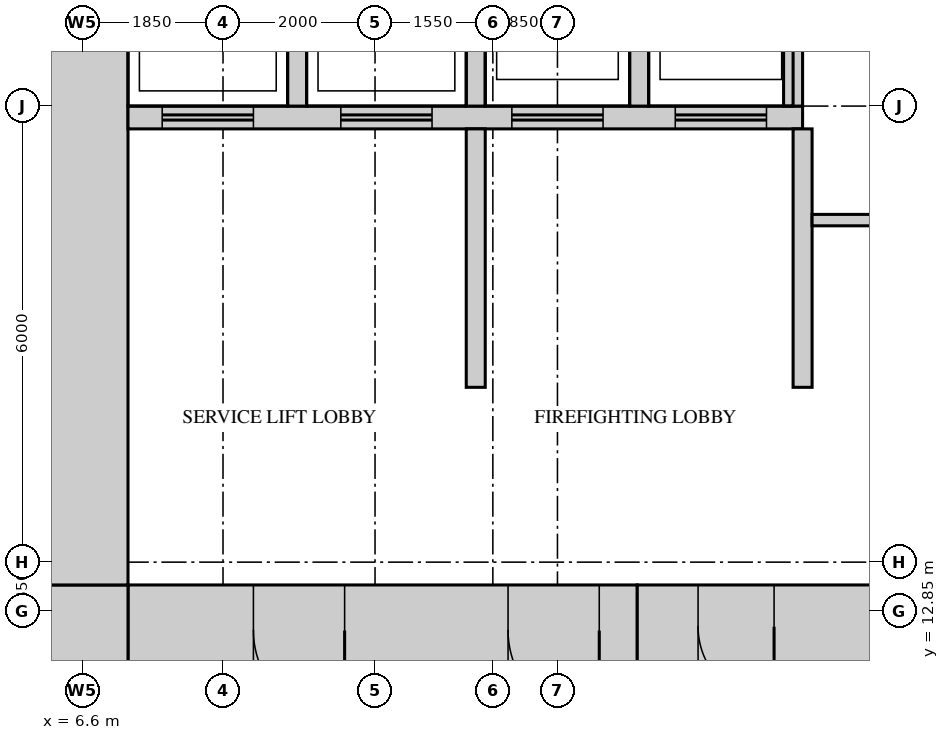
"""IFC4 building model, lengths in metres.
Left out: names, types, materials, properties, quantities, classifications, styles, units other than length and angle.
Written with IfcOpenShell. Run it as: python <this file> out.ifc"""

import sys

from ifc_helpers import new_model, si_unit, direction, frame, frame_2d, origin, place, context, subcontext, project, spatial, rectangle, extrude, source, transform, mapped, element, fill, save


model = new_model("IFC4")
c1 = context("Model", 3, precision=1e-05, world=origin(), true_north=direction((0.0, 1.0)))
c2 = subcontext(c1, "Body", "Model", "MODEL_VIEW")
j1 = project(units=[si_unit("LENGTHUNIT", "METRE"), si_unit("PLANEANGLEUNIT", "RADIAN")], contexts=[c1])
p1 = place(None, origin())
s1 = spatial("IfcSite", under=j1, at=p1, CompositionType="ELEMENT")
p2 = place(p1, origin())
s2 = spatial("IfcBuilding", under=s1, at=p2, CompositionType="ELEMENT")
p3 = place(p2, frame((0.0, 0.0, 33.0)))
s3 = spatial("IfcBuildingStorey", under=s2, at=p3, CompositionType="ELEMENT", Elevation=33.0)
m1 = source(origin(), c2, "Body", "SweptSolid", [
    extrude(rectangle(XDim=6.7, YDim=1.2, at=frame_2d((3.35, 0.0))), origin(), (0.0, 0.0, 1.0), 4.2),
])
p4 = place(p3, frame((7.2, 12.6, 0.0), z_axis=(0.0, 0.0, 1.0), x_axis=(1.0, 0.0, 0.0)))
e1 = element("IfcWall", 1, at=p4, inside=s3, PredefinedType="SHEAR", context=c2, shape_type="MappedRepresentation", body=[
    mapped(m1, transform((0.0, 0.0, 0.0))),
])
m2 = source(origin(), c2, "Body", "SweptSolid", [
    extrude(rectangle(XDim=1.2, YDim=2.1, at=frame_2d((0.6, 1.05))), frame((0.0, 0.61, 0.0), z_axis=(0.0, -1.0, 0.0), x_axis=(1.0, 0.0, 0.0)), (0.0, 0.0, 1.0), 1.22),
])
p5 = place(p4, frame((5.0, 0.0, 0.0)))
e2 = element("IfcOpeningElement", 2, at=p5, cuts=e1, PredefinedType="OPENING", context=c2, shape_type="MappedRepresentation", body=[
    mapped(m2, transform((0.0, 0.0, 0.0))),
])
p6 = place(p4, frame((1.65, 0.0, 0.0)))
e3 = element("IfcOpeningElement", 3, at=p6, cuts=e1, PredefinedType="OPENING", context=c2, shape_type="MappedRepresentation", body=[
    mapped(m2, transform((0.0, 0.0, 0.0))),
])
m3 = source(origin(), c2, "Body", "SweptSolid", [
    extrude(rectangle(XDim=7.2, YDim=1.1, at=frame_2d((3.6, 0.0))), origin(), (0.0, 0.0, 1.0), 4.2),
])
p7 = place(p3, frame((13.9, 12.65, 0.0), z_axis=(0.0, 0.0, 1.0), x_axis=(1.0, 0.0, 0.0)))
e4 = element("IfcWall", 4, at=p7, inside=s3, PredefinedType="SHEAR", context=c2, shape_type="MappedRepresentation", body=[
    mapped(m3, transform((0.0, 0.0, 0.0))),
])
m4 = source(origin(), c2, "Body", "SweptSolid", [
    extrude(rectangle(XDim=1.0, YDim=2.1, at=frame_2d((0.5, 1.05))), frame((0.0, 0.56, 0.0), z_axis=(0.0, -1.0, 0.0), x_axis=(1.0, 0.0, 0.0)), (0.0, 0.0, 1.0), 1.12),
])
p8 = place(p7, frame((0.8, 0.0, 0.0)))
e5 = element("IfcOpeningElement", 5, at=p8, cuts=e4, PredefinedType="OPENING", context=c2, shape_type="MappedRepresentation", body=[
    mapped(m4, transform((0.0, 0.0, 0.0))),
])
m5 = source(origin(), c2, "Body", "SweptSolid", [
    extrude(rectangle(XDim=1.2, YDim=1.2, at=frame_2d((0.6, 0.0))), origin(), (0.0, 0.0, 1.0), 4.2),
])
p9 = place(p3, frame((6.0, 12.6, 0.0), z_axis=(0.0, 0.0, 1.0), x_axis=(1.0, 0.0, 0.0)))
e6 = element("IfcWall", 6, at=p9, inside=s3, PredefinedType="SHEAR", context=c2, shape_type="MappedRepresentation", body=[
    mapped(m5, transform((0.0, 0.0, 0.0))),
])
m6 = source(origin(), c2, "Body", "SweptSolid", [
    extrude(rectangle(XDim=27.6, YDim=1.2, at=frame_2d((13.8, 0.0))), origin(), (0.0, 0.0, 1.0), 4.2),
])
p10 = place(p3, frame((6.6, 13.2, 0.0), z_axis=(0.0, 0.0, 1.0), x_axis=(0.0, 1.0, 0.0)))
e7 = element("IfcWall", 7, at=p10, inside=s3, PredefinedType="SHEAR", context=c2, shape_type="MappedRepresentation", body=[
    mapped(m6, transform((0.0, 0.0, 0.0))),
])
m7 = source(origin(), c2, "Body", "SweptSolid", [
    extrude(rectangle(XDim=8.875, YDim=0.3, at=frame_2d((4.438, 0.0))), origin(), (0.0, 0.0, 1.0), 4.2),
])
p11 = place(p3, frame((7.2, 19.35, 0.0), z_axis=(0.0, 0.0, 1.0), x_axis=(1.0, 0.0, 0.0)))
e8 = element("IfcWall", 8, at=p11, inside=s3, PredefinedType="STANDARD", context=c2, shape_type="MappedRepresentation", body=[
    mapped(m7, transform((0.0, 0.0, 0.0))),
])
m8 = source(origin(), c2, "Body", "SweptSolid", [
    extrude(rectangle(XDim=1.2, YDim=2.1, at=frame_2d((0.6, 1.05))), frame((0.0, 0.16, 0.0), z_axis=(0.0, -1.0, 0.0), x_axis=(1.0, 0.0, 0.0)), (0.0, 0.0, 1.0), 0.32),
])
p12 = place(p11, frame((0.45, 0.0, 0.0)))
e9 = element("IfcOpeningElement", 9, at=p12, cuts=e8, PredefinedType="OPENING", context=c2, shape_type="MappedRepresentation", body=[
    mapped(m8, transform((0.0, 0.0, 0.0))),
])
p13 = place(p11, frame((2.8, 0.0, 0.0)))
e10 = element("IfcOpeningElement", 10, at=p13, cuts=e8, PredefinedType="OPENING", context=c2, shape_type="MappedRepresentation", body=[
    mapped(m8, transform((0.0, 0.0, 0.0))),
])
p14 = place(p11, frame((5.05, 0.0, 0.0)))
e11 = element("IfcOpeningElement", 11, at=p14, cuts=e8, PredefinedType="OPENING", context=c2, shape_type="MappedRepresentation", body=[
    mapped(m8, transform((0.0, 0.0, 0.0))),
])
p15 = place(p11, frame((7.2, 0.0, 0.0)))
e12 = element("IfcOpeningElement", 12, at=p15, cuts=e8, PredefinedType="OPENING", context=c2, shape_type="MappedRepresentation", body=[
    mapped(m8, transform((0.0, 0.0, 0.0))),
])
m9 = source(origin(), c2, "Body", "SweptSolid", [
    extrude(rectangle(XDim=3.1, YDim=0.25, at=frame_2d((1.55, 0.0))), origin(), (0.0, 0.0, 1.0), 4.2),
])
for number, where, z_axis, x_axis in (
    (13, (9.425, 19.5, 0.0), (0.0, 0.0, 1.0), (0.0, 1.0, 0.0)),
    (14, (11.775, 19.5, 0.0), (0.0, 0.0, 1.0), (0.0, 1.0, 0.0)),
    (15, (13.925, 19.5, 0.0), (0.0, 0.0, 1.0), (0.0, 1.0, 0.0)),
    (16, (15.95, 19.5, 0.0), (0.0, 0.0, 1.0), (0.0, 1.0, 0.0)),
):
    element("IfcWall", number, at=place(p3, frame(where, z_axis=z_axis, x_axis=x_axis)), inside=s3, PredefinedType="STANDARD", context=c2, shape_type="MappedRepresentation", body=[
        mapped(m9, transform((0.0, 0.0, 0.0))),
    ])
m10 = source(origin(), c2, "Body", "SweptSolid", [
    extrude(rectangle(XDim=3.4, YDim=0.25, at=frame_2d((1.7, 0.0))), origin(), (0.0, 0.0, 1.0), 4.2),
])
for number, where, z_axis, x_axis in (
    (17, (16.075, 15.8, 0.0), (0.0, 0.0, 1.0), (0.0, 1.0, 0.0)),
    (18, (11.775, 15.8, 0.0), (0.0, 0.0, 1.0), (0.0, 1.0, 0.0)),
):
    element("IfcWall", number, at=place(p3, frame(where, z_axis=z_axis, x_axis=x_axis)), inside=s3, PredefinedType="STANDARD", context=c2, shape_type="MappedRepresentation", body=[
        mapped(m10, transform((0.0, 0.0, 0.0))),
    ])
m11 = source(origin(), c2, "Body", "SweptSolid", [
    extrude(rectangle(XDim=6.6, YDim=0.15, at=frame_2d((3.3, 0.0))), origin(), (0.0, 0.0, 1.0), 4.3),
])
p16 = place(p3, frame((16.2, 18.0, 0.0), z_axis=(0.0, 0.0, 1.0), x_axis=(1.0, 0.0, 0.0)))
e19 = element("IfcWall", 19, at=p16, inside=s3, PredefinedType="PARTITIONING", context=c2, shape_type="MappedRepresentation", body=[
    mapped(m11, transform((0.0, 0.0, 0.0))),
])
m12 = source(origin(), c2, "Body", "SweptSolid", [
    extrude(rectangle(XDim=1.2, YDim=2.1, at=frame_2d((0.6, 1.05))), frame((0.0, 0.55, 0.0), z_axis=(0.0, -1.0, 0.0), x_axis=(1.0, 0.0, 0.0)), (0.0, 0.0, 1.0), 1.1),
])
p17 = place(p5, origin())
e20 = element("IfcDoor", 20, at=p17, inside=s3, OperationType="SINGLE_SWING_RIGHT", PredefinedType="DOOR", context=c2, shape_type="MappedRepresentation", body=[
    mapped(m12, transform((0.0, 0.0, 0.0))),
])
fill(e2, e20)
p18 = place(p6, origin())
e21 = element("IfcDoor", 21, at=p18, inside=s3, OperationType="SINGLE_SWING_RIGHT", PredefinedType="DOOR", context=c2, shape_type="MappedRepresentation", body=[
    mapped(m12, transform((0.0, 0.0, 0.0))),
])
fill(e3, e21)
m13 = source(origin(), c2, "Body", "SweptSolid", [
    extrude(rectangle(XDim=1.0, YDim=2.1, at=frame_2d((0.5, 1.05))), frame((0.0, 0.5, 0.0), z_axis=(0.0, -1.0, 0.0), x_axis=(1.0, 0.0, 0.0)), (0.0, 0.0, 1.0), 1.0),
])
p19 = place(p8, origin())
e22 = element("IfcDoor", 22, at=p19, inside=s3, OperationType="SINGLE_SWING_RIGHT", PredefinedType="DOOR", context=c2, shape_type="MappedRepresentation", body=[
    mapped(m13, transform((0.0, 0.0, 0.0))),
])
fill(e5, e22)
m14 = source(origin(), c2, "Body", "SweptSolid", [
    extrude(rectangle(XDim=1.2, YDim=2.1, at=frame_2d((0.6, 1.05))), frame((0.0, 0.025, 0.0), z_axis=(0.0, -1.0, 0.0), x_axis=(1.0, 0.0, 0.0)), (0.0, 0.0, 1.0), 0.05),
])
p20 = place(p12, origin())
e23 = element("IfcDoor", 23, at=p20, inside=s3, OperationType="DOUBLE_DOOR_SLIDING", PredefinedType="DOOR", context=c2, shape_type="MappedRepresentation", body=[
    mapped(m14, transform((0.0, 0.0, 0.0))),
])
fill(e9, e23)
p21 = place(p13, origin())
e24 = element("IfcDoor", 24, at=p21, inside=s3, OperationType="DOUBLE_DOOR_SLIDING", PredefinedType="DOOR", context=c2, shape_type="MappedRepresentation", body=[
    mapped(m14, transform((0.0, 0.0, 0.0))),
])
fill(e10, e24)
p22 = place(p14, origin())
e25 = element("IfcDoor", 25, at=p22, inside=s3, OperationType="DOUBLE_DOOR_SLIDING", PredefinedType="DOOR", context=c2, shape_type="MappedRepresentation", body=[
    mapped(m14, transform((0.0, 0.0, 0.0))),
])
fill(e11, e25)
p23 = place(p15, origin())
e26 = element("IfcDoor", 26, at=p23, inside=s3, OperationType="DOUBLE_DOOR_SLIDING", PredefinedType="DOOR", context=c2, shape_type="MappedRepresentation", body=[
    mapped(m14, transform((0.0, 0.0, 0.0))),
])
fill(e12, e26)
save(model, sys.argv[1])
